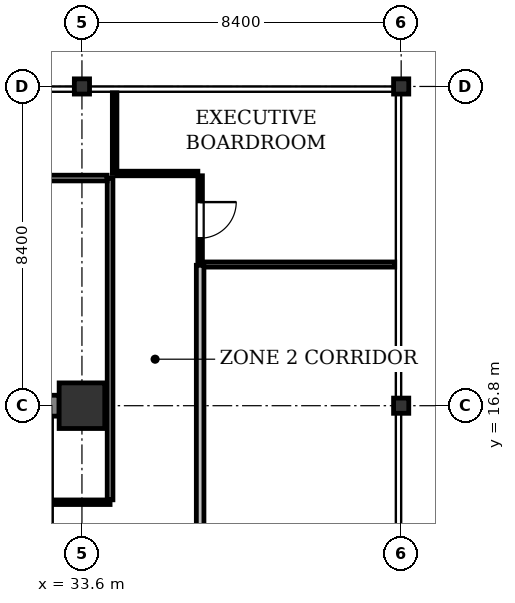
"""IFC4 building model, lengths in metres.
Left out: names, types, materials, properties, quantities, classifications, styles, units other than length and angle.
Written with IfcOpenShell. Run it as: python <this file> out.ifc"""

import sys

from ifc_helpers import new_model, si_unit, direction, frame, frame_2d, origin, origin_2d, place, context, subcontext, project, spatial, rectangle, i_section, extrude, element, fill, save


model = new_model("IFC4")
c1 = context("Model", 3, precision=1e-05, world=origin(), true_north=direction((0.0, 1.0)))
c2 = subcontext(c1, "Body", "Model", "MODEL_VIEW")
j1 = project(units=[si_unit("LENGTHUNIT", "METRE"), si_unit("PLANEANGLEUNIT", "RADIAN")], contexts=[c1])
p1 = place(None, origin())
s1 = spatial("IfcSite", under=j1, at=p1, CompositionType="ELEMENT")
p2 = place(p1, origin())
s2 = spatial("IfcBuilding", under=s1, at=p2, CompositionType="ELEMENT")
p3 = place(p2, frame((0.0, 0.0, 154.1)))
s3 = spatial("IfcBuildingStorey", under=s2, at=p3, CompositionType="ELEMENT", Elevation=154.1)
p4 = place(p3, frame((33.6, 16.8, 0.0), z_axis=(0.0, 0.0, 1.0), x_axis=(1.0, 0.0, 0.0)))
e1 = element("IfcColumn", 1, at=p4, inside=s3, PredefinedType="COLUMN", context=c2, shape_type="SweptSolid", body=[
    extrude(rectangle(XDim=1.2, YDim=1.2, at=origin_2d()), origin(), (0.0, 0.0, 1.0), 4.1),
])
for number, where, z_axis, x_axis in (
    (2, (33.6, 25.2, 0.0), (0.0, 0.0, 1.0), (1.0, 0.0, 0.0)),
    (3, (42.0, 16.8, 0.0), (0.0, 0.0, 1.0), (1.0, 0.0, 0.0)),
    (4, (42.0, 25.2, 0.0), (0.0, 0.0, 1.0), (1.0, 0.0, 0.0)),
):
    element("IfcColumn", number, at=place(p3, frame(where, z_axis=z_axis, x_axis=x_axis)), inside=s3, PredefinedType="COLUMN", context=c2, shape_type="SweptSolid", body=[
        extrude(i_section(OverallWidth=0.4, OverallDepth=0.4, WebThickness=0.025, FlangeThickness=0.04, at=origin_2d()), origin(), (0.0, 0.0, 1.0), 4.1),
    ])
p5 = place(p3, frame((25.8, 16.8, 0.0), z_axis=(0.0, 0.0, 1.0), x_axis=(1.0, 0.0, 0.0)))
e5 = element("IfcWall", 5, at=p5, inside=s3, PredefinedType="SHEAR", context=c2, shape_type="SweptSolid", body=[
    extrude(rectangle(XDim=7.2, YDim=0.55, at=frame_2d((3.6, 0.0))), origin(), (0.0, 0.0, 1.0), 3.825),
])
p6 = place(p3, frame((36.71, 22.85, 0.0), z_axis=(0.0, 0.0, 1.0), x_axis=(0.0, -1.0, 0.0)))
e6 = element("IfcWall", 6, at=p6, inside=s3, PredefinedType="PARTITIONING", context=c2, shape_type="SweptSolid", body=[
    extrude(rectangle(XDim=2.335, YDim=0.12, at=frame_2d((1.168, 0.0))), origin(), (0.0, 0.0, 1.0), 3.825),
])
p7 = place(p6, frame((0.693, 0.0, 0.0)))
e7 = element("IfcOpeningElement", 7, at=p7, cuts=e6, PredefinedType="OPENING", context=c2, shape_type="SweptSolid", body=[
    extrude(rectangle(XDim=0.95, YDim=2.15, at=frame_2d((0.475, 1.075))), frame((0.0, 0.07, 0.0), z_axis=(0.0, -1.0, 0.0), x_axis=(1.0, 0.0, 0.0)), (0.0, 0.0, 1.0), 0.14),
])
p8 = place(p3, frame((36.774, 20.515, 0.0), z_axis=(0.0, 0.0, 1.0), x_axis=(1.0, 0.0, 0.0)))
e8 = element("IfcWall", 8, at=p8, inside=s3, PredefinedType="PARTITIONING", context=c2, shape_type="SweptSolid", body=[
    extrude(rectangle(XDim=5.057, YDim=0.135, at=frame_2d((2.529, 0.0))), origin(), (0.0, 0.0, 1.0), 3.469),
])
p9 = place(p3, frame((34.46, 25.031, 0.0), z_axis=(0.0, 0.0, 1.0), x_axis=(0.0, -1.0, 0.0)))
e9 = element("IfcWall", 9, at=p9, inside=s3, PredefinedType="PARTITIONING", context=c2, shape_type="SweptSolid", body=[
    extrude(rectangle(XDim=2.121, YDim=0.12, at=frame_2d((1.061, 0.0))), origin(), (0.0, 0.0, 1.0), 3.825),
])
p10 = place(p3, frame((34.524, 22.91, 0.0), z_axis=(0.0, 0.0, 1.0), x_axis=(1.0, 0.0, 0.0)))
e10 = element("IfcWall", 10, at=p10, inside=s3, PredefinedType="PARTITIONING", context=c2, shape_type="SweptSolid", body=[
    extrude(rectangle(XDim=2.126, YDim=0.12, at=frame_2d((1.063, 0.0))), origin(), (0.0, 0.0, 1.0), 3.825),
])
p11 = place(p3, frame((32.804, 14.26, 0.0), z_axis=(0.0, 0.0, 1.0), x_axis=(1.0, 0.0, 0.0)))
e11 = element("IfcWall", 11, at=p11, inside=s3, PredefinedType="PARTITIONING", context=c2, shape_type="SweptSolid", body=[
    extrude(rectangle(XDim=1.536, YDim=0.12, at=frame_2d((0.768, 0.0))), origin(), (0.0, 0.0, 1.0), 3.297),
])
p12 = place(p3, frame((34.34, 14.324, 0.0), z_axis=(0.0, 0.0, 1.0), x_axis=(0.0, 1.0, 0.0)))
e12 = element("IfcWall", 12, at=p12, inside=s3, PredefinedType="PARTITIONING", context=c2, shape_type="SweptSolid", body=[
    extrude(rectangle(XDim=8.466, YDim=0.15, at=frame_2d((4.233, 0.0))), origin(), (0.0, 0.0, 1.0), 3.292),
])
p13 = place(p3, frame((34.261, 22.79, 0.0), z_axis=(0.0, 0.0, 1.0), x_axis=(-1.0, 0.0, 0.0)))
e13 = element("IfcWall", 13, at=p13, inside=s3, PredefinedType="PARTITIONING", context=c2, shape_type="SweptSolid", body=[
    extrude(rectangle(XDim=22.551, YDim=0.15, at=frame_2d((11.275, 0.0))), origin(), (0.0, 0.0, 1.0), 3.297),
])
p14 = place(p13, frame((10.801, 0.0, 0.0)))
e14 = element("IfcOpeningElement", 14, at=p14, cuts=e13, PredefinedType="OPENING", context=c2, shape_type="SweptSolid", body=[
    extrude(rectangle(XDim=0.95, YDim=2.15, at=frame_2d((0.475, 1.075))), frame((0.0, 0.085, 0.0), z_axis=(0.0, -1.0, 0.0), x_axis=(1.0, 0.0, 0.0)), (0.0, 0.0, 1.0), 0.17),
])
p15 = place(p3, frame((36.71, 20.495, 0.0), z_axis=(0.0, 0.0, 1.0), x_axis=(0.0, -1.0, 0.0)))
e15 = element("IfcWall", 15, at=p15, inside=s3, PredefinedType="PARTITIONING", context=c2, shape_type="SweptSolid", body=[
    extrude(rectangle(XDim=15.095, YDim=0.2, at=frame_2d((7.547, 0.0))), origin(), (0.0, 0.0, 1.0), 3.292),
])
p16 = place(p7, origin())
e16 = element("IfcDoor", 16, at=p16, inside=s3, OperationType="SINGLE_SWING_LEFT", PredefinedType="DOOR", context=c2, shape_type="SweptSolid", body=[
    extrude(rectangle(XDim=0.95, YDim=2.15, at=frame_2d((0.475, 1.075))), frame((0.0, 0.025, 0.0), z_axis=(0.0, -1.0, 0.0), x_axis=(1.0, 0.0, 0.0)), (0.0, 0.0, 1.0), 0.05),
])
fill(e7, e16)
save(model, sys.argv[1])
